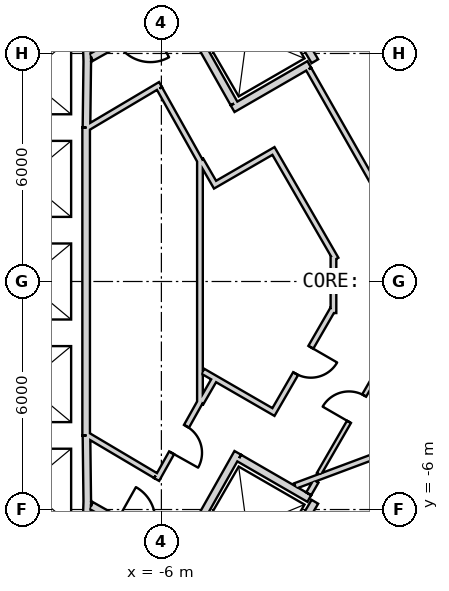
"""IFC4 building model, lengths in metres.
Left out: names, types, materials, properties, quantities, classifications, styles, units other than length and angle.
Written with IfcOpenShell. Run it as: python <this file> out.ifc"""

import sys

from ifc_helpers import new_model, si_unit, direction, frame, frame_2d, origin, place, context, subcontext, project, spatial, rectangle, extrude, element, fill, save


model = new_model("IFC4")
c1 = context("Model", 3, precision=1e-05, world=origin(), true_north=direction((0.0, 1.0)))
c2 = subcontext(c1, "Body", "Model", "MODEL_VIEW")
j1 = project(units=[si_unit("LENGTHUNIT", "METRE"), si_unit("PLANEANGLEUNIT", "RADIAN")], contexts=[c1])
p1 = place(None, origin())
s1 = spatial("IfcSite", under=j1, at=p1, CompositionType="ELEMENT")
p2 = place(p1, origin())
s2 = spatial("IfcBuilding", under=s1, at=p2, CompositionType="ELEMENT")
p3 = place(p2, frame((0.0, 0.0, 15.5)))
s3 = spatial("IfcBuildingStorey", under=s2, at=p3, CompositionType="ELEMENT", Elevation=15.5)
p4 = place(p3, frame((19.475, 2.208, 0.0), z_axis=(0.0, 0.0, 1.0), x_axis=(-0.866028369851, 0.499994862586, 0.0)))
e1 = element("IfcWall", 1, at=p4, inside=s3, PredefinedType="SHEAR", context=c2, shape_type="SweptSolid", body=[
    extrude(rectangle(XDim=31.523, YDim=0.9, at=frame_2d((15.762, 0.0))), origin(), (0.0, 0.0, 1.0), 6.0),
])
p5 = place(p4, frame((7.062, 0.0, 0.0)))
e2 = element("IfcOpeningElement", 2, at=p5, cuts=e1, PredefinedType="OPENING", context=c2, shape_type="SweptSolid", body=[
    extrude(rectangle(XDim=1.2, YDim=2.4, at=frame_2d((0.6, 1.2))), frame((0.0, 0.46, 0.0), z_axis=(0.0, -1.0, 0.0), x_axis=(1.0, 0.0, 0.0)), (0.0, 0.0, 1.0), 0.92),
])
p6 = place(p4, frame((9.762, 0.0, 0.0)))
e3 = element("IfcOpeningElement", 3, at=p6, cuts=e1, PredefinedType="OPENING", context=c2, shape_type="SweptSolid", body=[
    extrude(rectangle(XDim=1.2, YDim=2.4, at=frame_2d((0.6, 1.2))), frame((0.0, 0.46, 0.0), z_axis=(0.0, -1.0, 0.0), x_axis=(1.0, 0.0, 0.0)), (0.0, 0.0, 1.0), 0.92),
])
p7 = place(p4, frame((12.462, 0.0, 0.0)))
e4 = element("IfcOpeningElement", 4, at=p7, cuts=e1, PredefinedType="OPENING", context=c2, shape_type="SweptSolid", body=[
    extrude(rectangle(XDim=1.2, YDim=2.4, at=frame_2d((0.6, 1.2))), frame((0.0, 0.46, 0.0), z_axis=(0.0, -1.0, 0.0), x_axis=(1.0, 0.0, 0.0)), (0.0, 0.0, 1.0), 0.92),
])
p8 = place(p4, frame((15.162, 0.0, 0.0)))
e5 = element("IfcOpeningElement", 5, at=p8, cuts=e1, PredefinedType="OPENING", context=c2, shape_type="SweptSolid", body=[
    extrude(rectangle(XDim=1.2, YDim=2.4, at=frame_2d((0.6, 1.2))), frame((0.0, 0.46, 0.0), z_axis=(0.0, -1.0, 0.0), x_axis=(1.0, 0.0, 0.0)), (0.0, 0.0, 1.0), 0.92),
])
p9 = place(p4, frame((17.862, 0.0, 0.0)))
e6 = element("IfcOpeningElement", 6, at=p9, cuts=e1, PredefinedType="OPENING", context=c2, shape_type="SweptSolid", body=[
    extrude(rectangle(XDim=1.2, YDim=2.4, at=frame_2d((0.6, 1.2))), frame((0.0, 0.46, 0.0), z_axis=(0.0, -1.0, 0.0), x_axis=(1.0, 0.0, 0.0)), (0.0, 0.0, 1.0), 0.92),
])
p10 = place(p4, frame((20.562, 0.0, 0.0)))
e7 = element("IfcOpeningElement", 7, at=p10, cuts=e1, PredefinedType="OPENING", context=c2, shape_type="SweptSolid", body=[
    extrude(rectangle(XDim=1.2, YDim=2.4, at=frame_2d((0.6, 1.2))), frame((0.0, 0.46, 0.0), z_axis=(0.0, -1.0, 0.0), x_axis=(1.0, 0.0, 0.0)), (0.0, 0.0, 1.0), 0.92),
])
p11 = place(p4, frame((23.262, 0.0, 0.0)))
e8 = element("IfcOpeningElement", 8, at=p11, cuts=e1, PredefinedType="OPENING", context=c2, shape_type="SweptSolid", body=[
    extrude(rectangle(XDim=1.2, YDim=2.4, at=frame_2d((0.6, 1.2))), frame((0.0, 0.46, 0.0), z_axis=(0.0, -1.0, 0.0), x_axis=(1.0, 0.0, 0.0)), (0.0, 0.0, 1.0), 0.92),
])
p12 = place(p4, frame((3.612, 0.0, 0.0)))
e9 = element("IfcOpeningElement", 9, at=p12, cuts=e1, PredefinedType="OPENING", context=c2, shape_type="SweptSolid", body=[
    extrude(rectangle(XDim=1.2, YDim=2.4, at=frame_2d((0.6, 1.2))), frame((0.0, 0.46, 0.0), z_axis=(0.0, -1.0, 0.0), x_axis=(1.0, 0.0, 0.0)), (0.0, 0.0, 1.0), 0.92),
])
p13 = place(p4, frame((26.712, 0.0, 0.0)))
e10 = element("IfcOpeningElement", 10, at=p13, cuts=e1, PredefinedType="OPENING", context=c2, shape_type="SweptSolid", body=[
    extrude(rectangle(XDim=1.2, YDim=2.4, at=frame_2d((0.6, 1.2))), frame((0.0, 0.46, 0.0), z_axis=(0.0, -1.0, 0.0), x_axis=(1.0, 0.0, 0.0)), (0.0, 0.0, 1.0), 0.92),
])
p14 = place(p3, frame((-7.825, -17.97, 0.0), z_axis=(0.0, 0.0, 1.0), x_axis=(0.866028369851, 0.499994862586, 0.0)))
e11 = element("IfcWall", 11, at=p14, inside=s3, PredefinedType="SHEAR", context=c2, shape_type="SweptSolid", body=[
    extrude(rectangle(XDim=31.523, YDim=0.9, at=frame_2d((15.762, 0.0))), origin(), (0.0, 0.0, 1.0), 6.0),
])
p15 = place(p14, frame((7.062, 0.0, 0.0)))
e12 = element("IfcOpeningElement", 12, at=p15, cuts=e11, PredefinedType="OPENING", context=c2, shape_type="SweptSolid", body=[
    extrude(rectangle(XDim=1.2, YDim=2.4, at=frame_2d((0.6, 1.2))), frame((0.0, 0.46, 0.0), z_axis=(0.0, -1.0, 0.0), x_axis=(1.0, 0.0, 0.0)), (0.0, 0.0, 1.0), 0.92),
])
p16 = place(p14, frame((9.762, 0.0, 0.0)))
e13 = element("IfcOpeningElement", 13, at=p16, cuts=e11, PredefinedType="OPENING", context=c2, shape_type="SweptSolid", body=[
    extrude(rectangle(XDim=1.2, YDim=2.4, at=frame_2d((0.6, 1.2))), frame((0.0, 0.46, 0.0), z_axis=(0.0, -1.0, 0.0), x_axis=(1.0, 0.0, 0.0)), (0.0, 0.0, 1.0), 0.92),
])
p17 = place(p14, frame((12.462, 0.0, 0.0)))
e14 = element("IfcOpeningElement", 14, at=p17, cuts=e11, PredefinedType="OPENING", context=c2, shape_type="SweptSolid", body=[
    extrude(rectangle(XDim=1.2, YDim=2.4, at=frame_2d((0.6, 1.2))), frame((0.0, 0.46, 0.0), z_axis=(0.0, -1.0, 0.0), x_axis=(1.0, 0.0, 0.0)), (0.0, 0.0, 1.0), 0.92),
])
p18 = place(p14, frame((15.162, 0.0, 0.0)))
e15 = element("IfcOpeningElement", 15, at=p18, cuts=e11, PredefinedType="OPENING", context=c2, shape_type="SweptSolid", body=[
    extrude(rectangle(XDim=1.2, YDim=2.4, at=frame_2d((0.6, 1.2))), frame((0.0, 0.46, 0.0), z_axis=(0.0, -1.0, 0.0), x_axis=(1.0, 0.0, 0.0)), (0.0, 0.0, 1.0), 0.92),
])
p19 = place(p14, frame((17.862, 0.0, 0.0)))
e16 = element("IfcOpeningElement", 16, at=p19, cuts=e11, PredefinedType="OPENING", context=c2, shape_type="SweptSolid", body=[
    extrude(rectangle(XDim=1.2, YDim=2.4, at=frame_2d((0.6, 1.2))), frame((0.0, 0.46, 0.0), z_axis=(0.0, -1.0, 0.0), x_axis=(1.0, 0.0, 0.0)), (0.0, 0.0, 1.0), 0.92),
])
p20 = place(p14, frame((20.562, 0.0, 0.0)))
e17 = element("IfcOpeningElement", 17, at=p20, cuts=e11, PredefinedType="OPENING", context=c2, shape_type="SweptSolid", body=[
    extrude(rectangle(XDim=1.2, YDim=2.4, at=frame_2d((0.6, 1.2))), frame((0.0, 0.46, 0.0), z_axis=(0.0, -1.0, 0.0), x_axis=(1.0, 0.0, 0.0)), (0.0, 0.0, 1.0), 0.92),
])
p21 = place(p14, frame((26.712, 0.0, 0.0)))
e18 = element("IfcOpeningElement", 18, at=p21, cuts=e11, PredefinedType="OPENING", context=c2, shape_type="SweptSolid", body=[
    extrude(rectangle(XDim=1.2, YDim=2.4, at=frame_2d((0.6, 1.2))), frame((0.0, 0.46, 0.0), z_axis=(0.0, -1.0, 0.0), x_axis=(1.0, 0.0, 0.0)), (0.0, 0.0, 1.0), 0.92),
])
p22 = place(p14, frame((3.612, 0.0, 0.0)))
e19 = element("IfcOpeningElement", 19, at=p22, cuts=e11, PredefinedType="OPENING", context=c2, shape_type="SweptSolid", body=[
    extrude(rectangle(XDim=1.2, YDim=2.4, at=frame_2d((0.6, 1.2))), frame((0.0, 0.46, 0.0), z_axis=(0.0, -1.0, 0.0), x_axis=(1.0, 0.0, 0.0)), (0.0, 0.0, 1.0), 0.92),
])
p23 = place(p3, frame((-7.977, 6.65, 0.0), z_axis=(0.0, 0.0, 1.0), x_axis=(0.030861509705, -0.999523670164, 0.0)))
e20 = element("IfcWall", 20, at=p23, inside=s3, PredefinedType="PLUMBINGWALL", context=c2, shape_type="SweptSolid", body=[
    extrude(rectangle(XDim=0.878, YDim=0.2, at=frame_2d((0.439, 0.0))), origin(), (0.0, 0.0, 1.0), 5.7),
])
p24 = place(p3, frame((-7.949, 5.895, 0.0), z_axis=(0.0, 0.0, 1.0), x_axis=(-0.012042535896, -0.999927486035, 0.0)))
e21 = element("IfcWall", 21, at=p24, inside=s3, PredefinedType="PLUMBINGWALL", context=c2, shape_type="SweptSolid", body=[
    extrude(rectangle(XDim=1.845, YDim=0.2, at=frame_2d((0.922, 0.0))), origin(), (0.0, 0.0, 1.0), 5.7),
])
p25 = place(p3, frame((-7.98, 4.05, 0.0), z_axis=(0.0, 0.0, 1.0), x_axis=(0.0, -1.0, 0.0)))
e22 = element("IfcWall", 22, at=p25, inside=s3, PredefinedType="PLUMBINGWALL", context=c2, shape_type="SweptSolid", body=[
    extrude(rectangle(XDim=8.1, YDim=0.2, at=frame_2d((4.05, 0.0))), origin(), (0.0, 0.0, 1.0), 5.7),
])
p26 = place(p3, frame((-7.95, -5.772, 0.0), z_axis=(0.0, 0.0, 1.0), x_axis=(-0.030803413295, -0.999525462272, 0.0)))
e23 = element("IfcWall", 23, at=p26, inside=s3, PredefinedType="PLUMBINGWALL", context=c2, shape_type="SweptSolid", body=[
    extrude(rectangle(XDim=1.078, YDim=0.2, at=frame_2d((0.539, 0.0))), origin(), (0.0, 0.0, 1.0), 5.7),
])
p27 = place(p3, frame((-7.971, -4.05, 0.0), z_axis=(0.0, 0.0, 1.0), x_axis=(0.012042535896, -0.999927486035, 0.0)))
e24 = element("IfcWall", 24, at=p27, inside=s3, PredefinedType="PLUMBINGWALL", context=c2, shape_type="SweptSolid", body=[
    extrude(rectangle(XDim=1.845, YDim=0.2, at=frame_2d((0.922, 0.0))), origin(), (0.0, 0.0, 1.0), 5.7),
])
p28 = place(p3, frame((-3.538, 8.465, 0.0), z_axis=(0.0, 0.0, 1.0), x_axis=(0.508647062354, -0.860975125052, 0.0)))
e25 = element("IfcWall", 25, at=p28, inside=s3, PredefinedType="PLUMBINGWALL", context=c2, shape_type="SweptSolid", body=[
    extrude(rectangle(XDim=3.1, YDim=0.2, at=frame_2d((1.55, 0.0))), origin(), (0.0, 0.0, 1.0), 5.7),
])
p29 = place(p3, frame((-2.108, 5.711, 0.0), z_axis=(0.0, 0.0, 1.0), x_axis=(-0.866009305107, -0.50002788269, 0.0)))
e26 = element("IfcWall", 26, at=p29, inside=s3, PredefinedType="PLUMBINGWALL", context=c2, shape_type="SweptSolid", body=[
    extrude(rectangle(XDim=2.329, YDim=0.2, at=frame_2d((1.165, 0.0))), origin(), (0.0, 0.0, 1.0), 5.7),
])
p30 = place(p3, frame((-5.562, 7.296, 0.0), z_axis=(0.0, 0.0, 1.0), x_axis=(0.49134651263, -0.870964180966, 0.0)))
e27 = element("IfcWall", 27, at=p30, inside=s3, PredefinedType="PLUMBINGWALL", context=c2, shape_type="SweptSolid", body=[
    extrude(rectangle(XDim=3.0, YDim=0.2, at=frame_2d((1.5, 0.0))), origin(), (0.0, 0.0, 1.0), 5.7),
])
p31 = place(p3, frame((-1.961, -5.796, 0.0), z_axis=(0.0, 0.0, 1.0), x_axis=(-0.508647062354, -0.860975125052, 0.0)))
e28 = element("IfcWall", 28, at=p31, inside=s3, PredefinedType="PLUMBINGWALL", context=c2, shape_type="SweptSolid", body=[
    extrude(rectangle(XDim=3.1, YDim=0.2, at=frame_2d((1.55, 0.0))), origin(), (0.0, 0.0, 1.0), 5.7),
])
p32 = place(p3, frame((-3.99, -4.509, 0.0), z_axis=(0.0, 0.0, 1.0), x_axis=(-0.491358283181, -0.870957540612, 0.0)))
e29 = element("IfcWall", 29, at=p32, inside=s3, PredefinedType="PLUMBINGWALL", context=c2, shape_type="SweptSolid", body=[
    extrude(rectangle(XDim=3.2, YDim=0.2, at=frame_2d((1.6, 0.0))), origin(), (0.0, 0.0, 1.0), 5.7),
])
p33 = place(p3, frame((-3.953, -4.646, 0.0), z_axis=(0.0, 0.0, 1.0), x_axis=(0.866040491692, -0.499973866067, 0.0)))
e30 = element("IfcWall", 30, at=p33, inside=s3, PredefinedType="PLUMBINGWALL", context=c2, shape_type="SweptSolid", body=[
    extrude(rectangle(XDim=2.129, YDim=0.2, at=frame_2d((1.065, 0.0))), origin(), (0.0, 0.0, 1.0), 5.7),
])
p34 = place(p3, frame((-5.6, 7.16, 0.0), z_axis=(0.0, 0.0, 1.0), x_axis=(-0.871363259478, -0.490638431059, 0.0)))
e31 = element("IfcWall", 31, at=p34, inside=s3, PredefinedType="PARTITIONING", context=c2, shape_type="SweptSolid", body=[
    extrude(rectangle(XDim=2.581, YDim=0.2, at=frame_2d((1.291, 0.0))), origin(), (0.0, 0.0, 1.0), 5.7),
])
p35 = place(p34, frame((0.791, 0.0, 0.0)))
e32 = element("IfcOpeningElement", 32, at=p35, cuts=e31, PredefinedType="OPENING", context=c2, shape_type="SweptSolid", body=[
    extrude(rectangle(XDim=1.0, YDim=2.1, at=frame_2d((0.5, 1.05))), frame((0.0, 0.11, 0.0), z_axis=(0.0, -1.0, 0.0), x_axis=(1.0, 0.0, 0.0)), (0.0, 0.0, 1.0), 0.22),
])
p36 = place(p3, frame((-7.849, -5.894, 0.0), z_axis=(0.0, 0.0, 1.0), x_axis=(0.871363259478, -0.490638431059, 0.0)))
e33 = element("IfcWall", 33, at=p36, inside=s3, PredefinedType="PARTITIONING", context=c2, shape_type="SweptSolid", body=[
    extrude(rectangle(XDim=2.581, YDim=0.2, at=frame_2d((1.291, 0.0))), origin(), (0.0, 0.0, 1.0), 5.7),
])
p37 = place(p36, frame((0.791, 0.0, 0.0)))
e34 = element("IfcOpeningElement", 34, at=p37, cuts=e33, PredefinedType="OPENING", context=c2, shape_type="SweptSolid", body=[
    extrude(rectangle(XDim=1.0, YDim=2.1, at=frame_2d((0.5, 1.05))), frame((0.0, 0.11, 0.0), z_axis=(0.0, -1.0, 0.0), x_axis=(1.0, 0.0, 0.0)), (0.0, 0.0, 1.0), 0.22),
])
p38 = place(p3, frame((-2.124, 5.586, 0.0), z_axis=(0.0, 0.0, 1.0), x_axis=(0.494514430604, -0.869169418424, 0.0)))
e35 = element("IfcWall", 35, at=p38, inside=s3, PredefinedType="PLUMBINGWALL", context=c2, shape_type="SweptSolid", body=[
    extrude(rectangle(XDim=4.534, YDim=0.15, at=frame_2d((2.267, 0.0))), origin(), (0.0, 0.0, 1.0), 5.7),
])
p39 = place(p3, frame((4.807, -2.659, 0.0), z_axis=(0.0, 0.0, 1.0), x_axis=(-0.936818342118, -0.349816228714, 0.0)))
e36 = element("IfcWall", 36, at=p39, inside=s3, PredefinedType="PLUMBINGWALL", context=c2, shape_type="SweptSolid", body=[
    extrude(rectangle(XDim=7.78, YDim=0.15, at=frame_2d((3.89, 0.0))), origin(), (0.0, 0.0, 1.0), 5.7),
])
p40 = place(p3, frame((0.182, -1.535, 0.0), z_axis=(0.0, 0.0, 1.0), x_axis=(-0.499988401207, -0.866032100247, 0.0)))
e37 = element("IfcWall", 37, at=p40, inside=s3, PredefinedType="PARTITIONING", context=c2, shape_type="SweptSolid", body=[
    extrude(rectangle(XDim=4.079, YDim=0.12, at=frame_2d((2.04, 0.0))), origin(), (0.0, 0.0, 1.0), 5.7),
])
p41 = place(p40, frame((1.691, 0.0, 0.0)))
e38 = element("IfcOpeningElement", 38, at=p41, cuts=e37, PredefinedType="OPENING", context=c2, shape_type="SweptSolid", body=[
    extrude(rectangle(XDim=0.8, YDim=2.1, at=frame_2d((0.4, 1.05))), frame((0.0, 0.07, 0.0), z_axis=(0.0, -1.0, 0.0), x_axis=(1.0, 0.0, 0.0)), (0.0, 0.0, 1.0), 0.14),
])
p42 = place(p3, frame((-1.932, -5.256, 0.0), z_axis=(0.0, 0.0, 1.0), x_axis=(-0.499777709171, -0.866153705422, 0.0)))
e39 = element("IfcWall", 39, at=p42, inside=s3, PredefinedType="PLUMBINGWALL", context=c2, shape_type="SweptSolid", body=[
    extrude(rectangle(XDim=0.383, YDim=0.15, at=frame_2d((0.191, 0.0))), origin(), (0.0, 0.0, 1.0), 5.7),
])
p43 = place(p3, frame((-4.985, -3.235, 0.0), z_axis=(0.0, 0.0, 1.0), x_axis=(0.0, 1.0, 0.0)))
e40 = element("IfcWall", 40, at=p43, inside=s3, PredefinedType="PLUMBINGWALL", context=c2, shape_type="SweptSolid", body=[
    extrude(rectangle(XDim=6.469, YDim=0.15, at=frame_2d((3.235, 0.0))), origin(), (0.0, 0.0, 1.0), 5.7),
])
p44 = place(p3, frame((-6.125, -5.211, 0.0), z_axis=(0.0, 0.0, 1.0), x_axis=(0.488762436737, 0.87241691893, 0.0)))
e41 = element("IfcWall", 41, at=p44, inside=s3, PredefinedType="PLUMBINGWALL", context=c2, shape_type="SweptSolid", body=[
    extrude(rectangle(XDim=2.337, YDim=0.15, at=frame_2d((1.168, 0.0))), origin(), (0.0, 0.0, 1.0), 5.7),
])
p45 = place(p44, frame((0.806, 0.0, 0.0)))
e42 = element("IfcOpeningElement", 42, at=p45, cuts=e41, PredefinedType="OPENING", context=c2, shape_type="SweptSolid", body=[
    extrude(rectangle(XDim=0.8, YDim=2.1, at=frame_2d((0.4, 1.05))), frame((0.0, 0.085, 0.0), z_axis=(0.0, -1.0, 0.0), x_axis=(1.0, 0.0, 0.0)), (0.0, 0.0, 1.0), 0.17),
])
p46 = place(p3, frame((-7.95, -4.041, 0.0), z_axis=(0.0, 0.0, 1.0), x_axis=(0.860090281069, -0.510141851263, 0.0)))
e43 = element("IfcWall", 43, at=p46, inside=s3, PredefinedType="PLUMBINGWALL", context=c2, shape_type="SweptSolid", body=[
    extrude(rectangle(XDim=2.089, YDim=0.15, at=frame_2d((1.045, 0.0))), origin(), (0.0, 0.0, 1.0), 5.7),
])
p47 = place(p3, frame((-6.024, 5.183, 0.0), z_axis=(0.0, 0.0, 1.0), x_axis=(-0.860126804455, -0.510080268447, 0.0)))
e44 = element("IfcWall", 44, at=p47, inside=s3, PredefinedType="PLUMBINGWALL", context=c2, shape_type="SweptSolid", body=[
    extrude(rectangle(XDim=2.24, YDim=0.15, at=frame_2d((1.12, 0.0))), origin(), (0.0, 0.0, 1.0), 5.7),
])
p48 = place(p3, frame((-4.983, 3.172, 0.0), z_axis=(0.0, 0.0, 1.0), x_axis=(-0.488701962514, 0.872450796226, 0.0)))
e45 = element("IfcWall", 45, at=p48, inside=s3, PredefinedType="PLUMBINGWALL", context=c2, shape_type="SweptSolid", body=[
    extrude(rectangle(XDim=2.187, YDim=0.15, at=frame_2d((1.093, 0.0))), origin(), (0.0, 0.0, 1.0), 5.7),
])
p49 = place(p3, frame((-4.551, 2.482, 0.0), z_axis=(0.0, 0.0, 1.0), x_axis=(-0.499852395195, 0.866110606688, 0.0)))
e46 = element("IfcWall", 46, at=p49, inside=s3, PredefinedType="PLUMBINGWALL", context=c2, shape_type="SweptSolid", body=[
    extrude(rectangle(XDim=0.813, YDim=0.15, at=frame_2d((0.407, 0.0))), origin(), (0.0, 0.0, 1.0), 5.7),
])
p50 = place(p3, frame((-2.986, 3.472, 0.0), z_axis=(0.0, 0.0, 1.0), x_axis=(-0.866059624469, -0.499940723351, 0.0)))
e47 = element("IfcWall", 47, at=p50, inside=s3, PredefinedType="PLUMBINGWALL", context=c2, shape_type="SweptSolid", body=[
    extrude(rectangle(XDim=1.775, YDim=0.15, at=frame_2d((0.888, 0.0))), origin(), (0.0, 0.0, 1.0), 5.7),
])
p51 = place(p3, frame((-1.407, 0.587, 0.0), z_axis=(0.0, 0.0, 1.0), x_axis=(-0.500029427677, 0.866008413041, 0.0)))
e48 = element("IfcWall", 48, at=p51, inside=s3, PredefinedType="PLUMBINGWALL", context=c2, shape_type="SweptSolid", body=[
    extrude(rectangle(XDim=3.213, YDim=0.15, at=frame_2d((1.606, 0.0))), origin(), (0.0, 0.0, 1.0), 5.7),
])
p52 = place(p3, frame((-1.472, -0.83, 0.0), z_axis=(0.0, 0.0, 1.0), x_axis=(0.0, 1.0, 0.0)))
e49 = element("IfcWall", 49, at=p52, inside=s3, PredefinedType="PLUMBINGWALL", context=c2, shape_type="SweptSolid", body=[
    extrude(rectangle(XDim=1.507, YDim=0.15, at=frame_2d((0.753, 0.0))), origin(), (0.0, 0.0, 1.0), 5.7),
])
p53 = place(p3, frame((-3.089, -3.5, 0.0), z_axis=(0.0, 0.0, 1.0), x_axis=(0.500025362525, 0.866010760229, 0.0)))
e50 = element("IfcWall", 50, at=p53, inside=s3, PredefinedType="PLUMBINGWALL", context=c2, shape_type="SweptSolid", body=[
    extrude(rectangle(XDim=3.209, YDim=0.15, at=frame_2d((1.604, 0.0))), origin(), (0.0, 0.0, 1.0), 5.7),
])
p54 = place(p53, frame((1.242, 0.0, 0.0)))
e51 = element("IfcOpeningElement", 51, at=p54, cuts=e50, PredefinedType="OPENING", context=c2, shape_type="SweptSolid", body=[
    extrude(rectangle(XDim=0.8, YDim=2.1, at=frame_2d((0.4, 1.05))), frame((0.0, 0.085, 0.0), z_axis=(0.0, -1.0, 0.0), x_axis=(1.0, 0.0, 0.0)), (0.0, 0.0, 1.0), 0.17),
])
p55 = place(p3, frame((-4.91, -2.361, 0.0), z_axis=(0.0, 0.0, 1.0), x_axis=(0.866022705876, -0.500004672885, 0.0)))
e52 = element("IfcWall", 52, at=p55, inside=s3, PredefinedType="PLUMBINGWALL", context=c2, shape_type="SweptSolid", body=[
    extrude(rectangle(XDim=2.072, YDim=0.15, at=frame_2d((1.036, 0.0))), origin(), (0.0, 0.0, 1.0), 5.7),
])
p56 = place(p3, frame((-4.957, -3.187, 0.0), z_axis=(0.0, 0.0, 1.0), x_axis=(0.499860530385, 0.866105911632, 0.0)))
e53 = element("IfcWall", 53, at=p56, inside=s3, PredefinedType="PLUMBINGWALL", context=c2, shape_type="SweptSolid", body=[
    extrude(rectangle(XDim=0.663, YDim=0.15, at=frame_2d((0.332, 0.0))), origin(), (0.0, 0.0, 1.0), 5.7),
])
p57 = place(p41, origin())
e54 = element("IfcDoor", 54, at=p57, inside=s3, OperationType="SINGLE_SWING_RIGHT", PredefinedType="USERDEFINED", context=c2, shape_type="SweptSolid", body=[
    extrude(rectangle(XDim=0.8, YDim=2.1, at=frame_2d((0.4, 1.05))), frame((0.0, 0.025, 0.0), z_axis=(0.0, -1.0, 0.0), x_axis=(1.0, 0.0, 0.0)), (0.0, 0.0, 1.0), 0.05),
])
fill(e38, e54)
p58 = place(p45, origin())
e55 = element("IfcDoor", 55, at=p58, inside=s3, OperationType="SINGLE_SWING_LEFT", PredefinedType="USERDEFINED", context=c2, shape_type="SweptSolid", body=[
    extrude(rectangle(XDim=0.8, YDim=2.1, at=frame_2d((0.4, 1.05))), frame((0.0, 0.025, 0.0), z_axis=(0.0, -1.0, 0.0), x_axis=(1.0, 0.0, 0.0)), (0.0, 0.0, 1.0), 0.05),
])
fill(e42, e55)
p59 = place(p54, origin())
e56 = element("IfcDoor", 56, at=p59, inside=s3, OperationType="SINGLE_SWING_RIGHT", PredefinedType="USERDEFINED", context=c2, shape_type="SweptSolid", body=[
    extrude(rectangle(XDim=0.8, YDim=2.1, at=frame_2d((0.4, 1.05))), frame((0.0, 0.025, 0.0), z_axis=(0.0, -1.0, 0.0), x_axis=(1.0, 0.0, 0.0)), (0.0, 0.0, 1.0), 0.05),
])
fill(e51, e56)
save(model, sys.argv[1])
